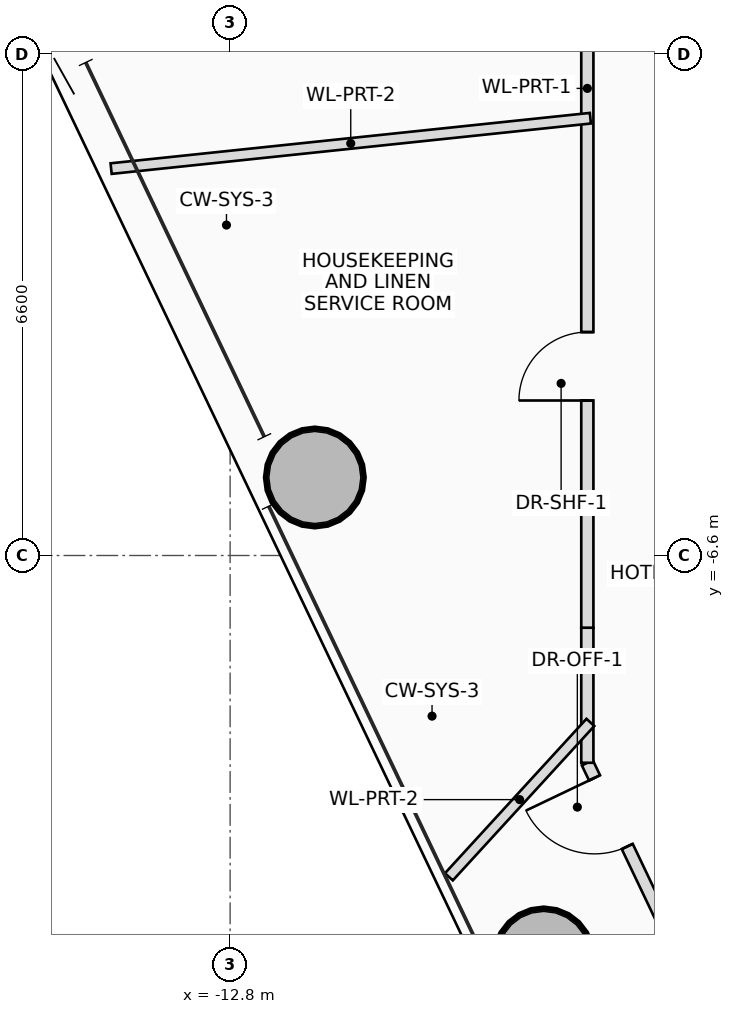
"""IFC4 building model, lengths in metres.
Left out: names, types, materials, properties, quantities, classifications, styles, units other than length and angle.
Written with IfcOpenShell. Run it as: python <this file> out.ifc"""

import sys

from ifc_helpers import new_model, si_unit, direction, frame, frame_2d, origin, origin_2d, place, context, subcontext, project, spatial, rectangle, hollow_circle, extrude, source, transform, mapped, element, fill, save


model = new_model("IFC4")
c1 = context("Model", 3, precision=1e-05, world=origin(), true_north=direction((0.0, 1.0)))
c2 = subcontext(c1, "Body", "Model", "MODEL_VIEW")
j1 = project(units=[si_unit("LENGTHUNIT", "METRE"), si_unit("PLANEANGLEUNIT", "RADIAN")], contexts=[c1])
p1 = place(None, origin())
s1 = spatial("IfcSite", under=j1, at=p1, CompositionType="ELEMENT")
p2 = place(p1, origin())
s2 = spatial("IfcBuilding", under=s1, at=p2, CompositionType="ELEMENT")
p3 = place(p2, frame((0.0, 0.0, 136.4)))
s3 = spatial("IfcBuildingStorey", under=s2, at=p3, CompositionType="ELEMENT", Elevation=136.4)
m1 = source(origin(), c2, "Body", "SweptSolid", [
    extrude(hollow_circle(Radius=0.65, WallThickness=0.045, at=origin_2d()), origin(), (0.0, 0.0, 1.0), 3.45),
])
for number, where, z_axis, x_axis in (
    (1, (-11.685, -5.573, 0.0), (0.0, 0.0, 1.0), (1.0, 0.0, 0.0)),
    (2, (-8.674, -11.888, 0.0), (0.0, 0.0, 1.0), (1.0, 0.0, 0.0)),
):
    element("IfcColumn", number, at=place(p3, frame(where, z_axis=z_axis, x_axis=x_axis)), inside=s3, PredefinedType="COLUMN", context=c2, shape_type="MappedRepresentation", body=[
        mapped(m1, transform((0.0, 0.0, 0.0), scale=1.0)),
    ])
p4 = place(p3, frame((-6.539, -12.6, 0.0), z_axis=(0.0, 0.0, 1.0), x_axis=(-0.430521464151, 0.902580339308, 0.0)))
e3 = element("IfcWall", 3, at=p4, inside=s3, PredefinedType="PARTITIONING", context=c2, shape_type="SweptSolid", body=[
    extrude(rectangle(XDim=3.626, YDim=0.16, at=frame_2d((1.813, 0.0))), origin(), (0.0, 0.0, 1.0), 2.605),
])
p5 = place(p4, frame((2.406, 0.0, 0.0)))
e4 = element("IfcOpeningElement", 4, at=p5, cuts=e3, PredefinedType="OPENING", context=c2, shape_type="SweptSolid", body=[
    extrude(rectangle(XDim=1.0, YDim=2.25, at=frame_2d((0.5, 1.125))), frame((0.0, 0.09, 0.0), z_axis=(0.0, -1.0, 0.0), x_axis=(1.0, 0.0, 0.0)), (0.0, 0.0, 1.0), 0.18),
])
p6 = place(p3, frame((-8.1, -9.327, 0.0), z_axis=(0.0, 0.0, 1.0), x_axis=(0.0, 1.0, 0.0)))
e5 = element("IfcWall", 5, at=p6, inside=s3, PredefinedType="PARTITIONING", context=c2, shape_type="SweptSolid", body=[
    extrude(rectangle(XDim=1.777, YDim=0.16, at=frame_2d((0.888, 0.0))), origin(), (0.0, 0.0, 1.0), 3.25),
])
p7 = place(p3, frame((-8.1, -7.55, 0.0), z_axis=(0.0, 0.0, 1.0), x_axis=(0.0, 1.0, 0.0)))
e6 = element("IfcWall", 6, at=p7, inside=s3, PredefinedType="PARTITIONING", context=c2, shape_type="SweptSolid", body=[
    extrude(rectangle(XDim=15.1, YDim=0.16, at=frame_2d((7.55, 0.0))), origin(), (0.0, 0.0, 1.0), 2.605),
])
p8 = place(p7, frame((2.989, 0.0, 0.0)))
e7 = element("IfcOpeningElement", 7, at=p8, cuts=e6, PredefinedType="OPENING", context=c2, shape_type="SweptSolid", body=[
    extrude(rectangle(XDim=0.9, YDim=2.05, at=frame_2d((0.45, 1.025))), frame((0.0, 0.09, 0.0), z_axis=(0.0, -1.0, 0.0), x_axis=(1.0, 0.0, 0.0)), (0.0, 0.0, 1.0), 0.18),
])
p9 = place(p7, frame((10.301, 0.0, 0.0)))
e8 = element("IfcOpeningElement", 8, at=p9, cuts=e6, PredefinedType="OPENING", context=c2, shape_type="SweptSolid", body=[
    extrude(rectangle(XDim=1.0, YDim=2.25, at=frame_2d((0.5, 1.125))), frame((0.0, 0.09, 0.0), z_axis=(0.0, -1.0, 0.0), x_axis=(1.0, 0.0, 0.0)), (0.0, 0.0, 1.0), 0.18),
])
p10 = place(p3, frame((-8.06, -0.847, 0.0), z_axis=(0.0, 0.0, 1.0), x_axis=(-0.994520422967, -0.104542471285, 0.0)))
e9 = element("IfcWall", 9, at=p10, inside=s3, PredefinedType="PARTITIONING", context=c2, shape_type="SweptSolid", body=[
    extrude(rectangle(XDim=6.34, YDim=0.14, at=frame_2d((3.17, 0.0))), origin(), (0.0, 0.0, 1.0), 2.765),
])
p11 = place(p3, frame((-8.06, -8.796, 0.0), z_axis=(0.0, 0.0, 1.0), x_axis=(-0.67555207399, -0.737312278026, 0.0)))
e10 = element("IfcWall", 10, at=p11, inside=s3, PredefinedType="PARTITIONING", context=c2, shape_type="SweptSolid", body=[
    extrude(rectangle(XDim=2.755, YDim=0.14, at=frame_2d((1.378, 0.0))), origin(), (0.0, 0.0, 1.0), 2.765),
])
p12 = place(p5, origin())
e11 = element("IfcDoor", 11, at=p12, inside=s3, OperationType="SINGLE_SWING_RIGHT", PredefinedType="DOOR", context=c2, shape_type="SweptSolid", body=[
    extrude(rectangle(XDim=1.0, YDim=2.25, at=frame_2d((0.5, 1.125))), frame((0.0, 0.025, 0.0), z_axis=(0.0, -1.0, 0.0), x_axis=(1.0, 0.0, 0.0)), (0.0, 0.0, 1.0), 0.05),
])
fill(e4, e11)
p13 = place(p8, origin())
e12 = element("IfcDoor", 12, at=p13, inside=s3, OperationType="SINGLE_SWING_LEFT", PredefinedType="DOOR", context=c2, shape_type="SweptSolid", body=[
    extrude(rectangle(XDim=0.9, YDim=2.05, at=frame_2d((0.45, 1.025))), frame((0.0, 0.025, 0.0), z_axis=(0.0, -1.0, 0.0), x_axis=(1.0, 0.0, 0.0)), (0.0, 0.0, 1.0), 0.05),
])
fill(e7, e12)
save(model, sys.argv[1])
